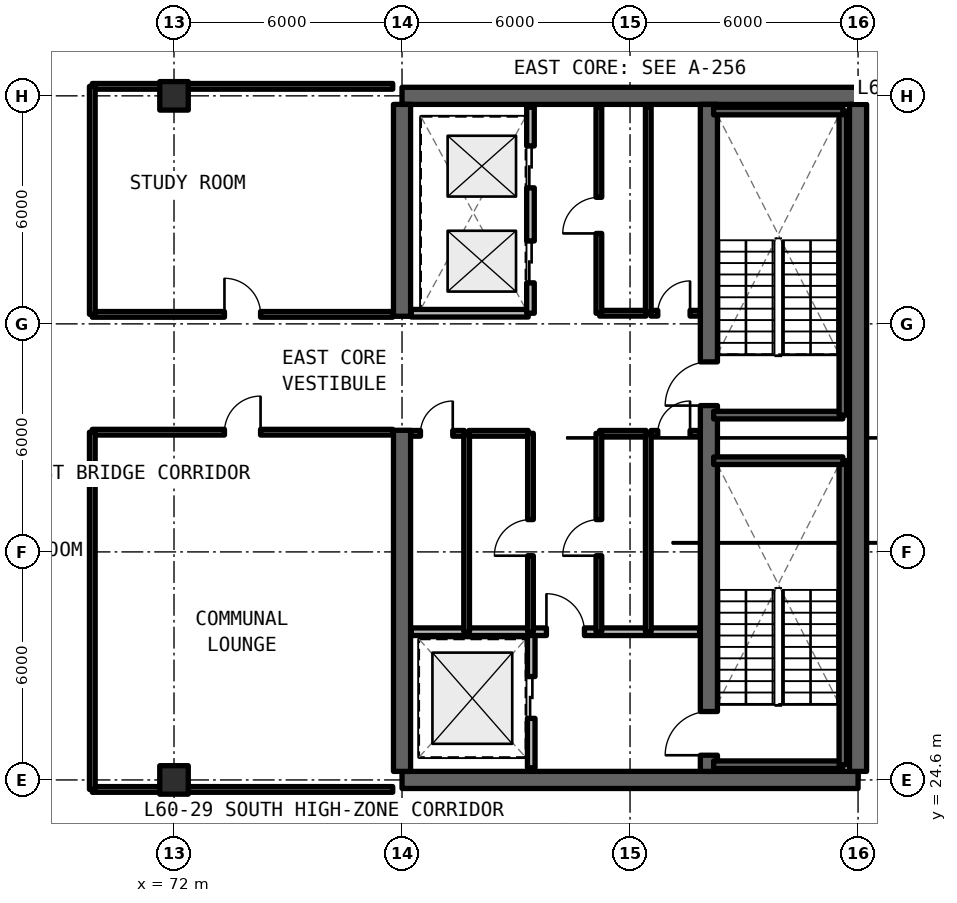
"""IFC4 building model, lengths in metres.
Left out: names, types, materials, properties, quantities, classifications, styles, units other than length and angle.
Written with IfcOpenShell. Run it as: python <this file> out.ifc"""

import sys

from ifc_helpers import new_model, si_unit, direction, frame, frame_2d, origin, origin_2d, place, context, subcontext, project, spatial, rectangle, extrude, element, fill, save


model = new_model("IFC4")
c1 = context("Model", 3, precision=1e-05, world=origin(), true_north=direction((0.0, 1.0)))
c2 = subcontext(c1, "Body", "Model", "MODEL_VIEW")
j1 = project(units=[si_unit("LENGTHUNIT", "METRE"), si_unit("PLANEANGLEUNIT", "RADIAN")], contexts=[c1])
p1 = place(None, origin())
s1 = spatial("IfcSite", under=j1, at=p1, CompositionType="ELEMENT")
p2 = place(p1, origin())
s2 = spatial("IfcBuilding", under=s1, at=p2, CompositionType="ELEMENT")
p3 = place(p2, frame((0.0, 0.0, 215.49)))
s3 = spatial("IfcBuildingStorey", under=s2, at=p3, CompositionType="ELEMENT", Elevation=215.49)
for number, where, z_axis, x_axis in (
    (1, (78.0, 24.6, 0.0), (0.0, 0.0, 1.0), (1.0, 0.0, 0.0)),
    (2, (90.0, 42.6, 0.0), (0.0, 0.0, 1.0), (-1.0, 0.0, 0.0)),
):
    element("IfcWall", number, at=place(p3, frame(where, z_axis=z_axis, x_axis=x_axis)), inside=s3, PredefinedType="SHEAR", context=c2, shape_type="SweptSolid", body=[
        extrude(rectangle(XDim=12.0, YDim=0.45, at=frame_2d((6.0, 0.0))), origin(), (0.0, 0.0, 1.0), 3.63),
    ])
p4 = place(p3, frame((90.0, 24.825, 0.0), z_axis=(0.0, 0.0, 1.0), x_axis=(0.0, 1.0, 0.0)))
e3 = element("IfcWall", 3, at=p4, inside=s3, PredefinedType="SHEAR", context=c2, shape_type="SweptSolid", body=[
    extrude(rectangle(XDim=17.55, YDim=0.45, at=frame_2d((8.775, 0.0))), origin(), (0.0, 0.0, 1.0), 3.63),
])
p5 = place(p3, frame((78.0, 24.825, 0.0), z_axis=(0.0, 0.0, 1.0), x_axis=(0.0, 1.0, 0.0)))
e4 = element("IfcWall", 4, at=p5, inside=s3, PredefinedType="SHEAR", context=c2, shape_type="SweptSolid", body=[
    extrude(rectangle(XDim=8.975, YDim=0.45, at=frame_2d((4.488, 0.0))), origin(), (0.0, 0.0, 1.0), 3.63),
])
p6 = place(p3, frame((78.0, 36.8, 0.0), z_axis=(0.0, 0.0, 1.0), x_axis=(0.0, 1.0, 0.0)))
e5 = element("IfcWall", 5, at=p6, inside=s3, PredefinedType="SHEAR", context=c2, shape_type="SweptSolid", body=[
    extrude(rectangle(XDim=5.575, YDim=0.45, at=frame_2d((2.788, 0.0))), origin(), (0.0, 0.0, 1.0), 3.63),
])
p7 = place(p3, frame((86.075, 24.825, 0.0), z_axis=(0.0, 0.0, 1.0), x_axis=(0.0, 1.0, 0.0)))
e6 = element("IfcWall", 6, at=p7, inside=s3, PredefinedType="SHEAR", context=c2, shape_type="SweptSolid", body=[
    extrude(rectangle(XDim=17.55, YDim=0.45, at=frame_2d((8.775, 0.0))), origin(), (0.0, 0.0, 1.0), 3.63),
])
p8 = place(p7, frame((0.425, 0.0, 0.0)))
e7 = element("IfcOpeningElement", 7, at=p8, cuts=e6, PredefinedType="OPENING", context=c2, shape_type="SweptSolid", body=[
    extrude(rectangle(XDim=1.15, YDim=2.15, at=frame_2d((0.575, 1.075))), frame((0.0, 0.235, 0.0), z_axis=(0.0, -1.0, 0.0), x_axis=(1.0, 0.0, 0.0)), (0.0, 0.0, 1.0), 0.47),
])
p9 = place(p7, frame((9.625, 0.0, 0.0)))
e8 = element("IfcOpeningElement", 8, at=p9, cuts=e6, PredefinedType="OPENING", context=c2, shape_type="SweptSolid", body=[
    extrude(rectangle(XDim=1.15, YDim=2.15, at=frame_2d((0.575, 1.075))), frame((0.0, 0.235, 0.0), z_axis=(0.0, -1.0, 0.0), x_axis=(1.0, 0.0, 0.0)), (0.0, 0.0, 1.0), 0.47),
])
for number, where, z_axis, x_axis in (
    (9, (72.0, 24.6, 0.0), (0.0, 0.0, 1.0), (1.0, 0.0, 0.0)),
    (10, (72.0, 42.6, 0.0), (0.0, 0.0, 1.0), (1.0, 0.0, 0.0)),
):
    element("IfcColumn", number, at=place(p3, frame(where, z_axis=z_axis, x_axis=x_axis)), inside=s3, PredefinedType="COLUMN", context=c2, shape_type="SweptSolid", body=[
        extrude(rectangle(XDim=0.75, YDim=0.75, at=origin_2d()), origin(), (0.0, 0.0, 1.0), 3.63),
    ])
p10 = place(p3, frame((81.4, 24.92, 0.0), z_axis=(0.0, 0.0, 1.0), x_axis=(0.0, 1.0, 0.0)))
e11 = element("IfcWall", 11, at=p10, inside=s3, PredefinedType="SOLIDWALL", context=c2, shape_type="SweptSolid", body=[
    extrude(rectangle(XDim=3.58, YDim=0.2, at=frame_2d((1.79, 0.0))), origin(), (0.0, 0.0, 1.0), 2.63),
])
p11 = place(p10, frame((1.3, 0.0, 0.0)))
e12 = element("IfcOpeningElement", 12, at=p11, cuts=e11, PredefinedType="OPENING", context=c2, shape_type="SweptSolid", body=[
    extrude(rectangle(XDim=1.1, YDim=2.2, at=frame_2d((0.55, 1.1))), frame((0.0, 0.11, 0.0), z_axis=(0.0, -1.0, 0.0), x_axis=(1.0, 0.0, 0.0)), (0.0, 0.0, 1.0), 0.22),
])
p12 = place(p3, frame((78.245, 28.5, 0.0), z_axis=(0.0, 0.0, 1.0), x_axis=(1.0, 0.0, 0.0)))
e13 = element("IfcWall", 13, at=p12, inside=s3, PredefinedType="SOLIDWALL", context=c2, shape_type="SweptSolid", body=[
    extrude(rectangle(XDim=7.585, YDim=0.2, at=frame_2d((3.792, 0.0))), origin(), (0.0, 0.0, 1.0), 2.63),
])
p13 = place(p12, frame((3.555, 0.0, 0.0)))
e14 = element("IfcOpeningElement", 14, at=p13, cuts=e13, PredefinedType="OPENING", context=c2, shape_type="SweptSolid", body=[
    extrude(rectangle(XDim=1.0, YDim=2.15, at=frame_2d((0.5, 1.075))), frame((0.0, 0.11, 0.0), z_axis=(0.0, -1.0, 0.0), x_axis=(1.0, 0.0, 0.0)), (0.0, 0.0, 1.0), 0.22),
])
p14 = place(p3, frame((84.48, 28.5, 0.0), z_axis=(0.0, 0.0, 1.0), x_axis=(0.0, 1.0, 0.0)))
e15 = element("IfcWall", 15, at=p14, inside=s3, PredefinedType="SOLIDWALL", context=c2, shape_type="SweptSolid", body=[
    extrude(rectangle(XDim=5.22, YDim=0.15, at=frame_2d((2.61, 0.0))), origin(), (0.0, 0.0, 1.0), 2.63),
])
p15 = place(p3, frame((84.55, 33.72, 0.0), z_axis=(0.0, 0.0, 1.0), x_axis=(1.0, 0.0, 0.0)))
e16 = element("IfcWall", 16, at=p15, inside=s3, PredefinedType="SOLIDWALL", context=c2, shape_type="SweptSolid", body=[
    extrude(rectangle(XDim=1.28, YDim=0.15, at=frame_2d((0.64, 0.0))), origin(), (0.0, 0.0, 1.0), 2.63),
])
p16 = place(p15, frame((0.18, 0.0, 0.0)))
e17 = element("IfcOpeningElement", 17, at=p16, cuts=e16, PredefinedType="OPENING", context=c2, shape_type="SweptSolid", body=[
    extrude(rectangle(XDim=0.85, YDim=2.1, at=frame_2d((0.425, 1.05))), frame((0.0, 0.085, 0.0), z_axis=(0.0, -1.0, 0.0), x_axis=(1.0, 0.0, 0.0)), (0.0, 0.0, 1.0), 0.17),
])
p17 = place(p3, frame((83.2, 33.72, 0.0), z_axis=(0.0, 0.0, 1.0), x_axis=(1.0, 0.0, 0.0)))
e18 = element("IfcWall", 18, at=p17, inside=s3, PredefinedType="SOLIDWALL", context=c2, shape_type="SweptSolid", body=[
    extrude(rectangle(XDim=1.22, YDim=0.15, at=frame_2d((0.61, 0.0))), origin(), (0.0, 0.0, 1.0), 2.63),
])
p18 = place(p3, frame((83.18, 28.5, 0.0), z_axis=(0.0, 0.0, 1.0), x_axis=(0.0, 1.0, 0.0)))
e19 = element("IfcWall", 19, at=p18, inside=s3, PredefinedType="SOLIDWALL", context=c2, shape_type="SweptSolid", body=[
    extrude(rectangle(XDim=5.22, YDim=0.15, at=frame_2d((2.61, 0.0))), origin(), (0.0, 0.0, 1.0), 2.63),
])
p19 = place(p18, frame((2.0, 0.0, 0.0)))
e20 = element("IfcOpeningElement", 20, at=p19, cuts=e19, PredefinedType="OPENING", context=c2, shape_type="SweptSolid", body=[
    extrude(rectangle(XDim=0.95, YDim=2.15, at=frame_2d((0.475, 1.075))), frame((0.0, 0.085, 0.0), z_axis=(0.0, -1.0, 0.0), x_axis=(1.0, 0.0, 0.0)), (0.0, 0.0, 1.0), 0.17),
])
p20 = place(p3, frame((79.7, 28.5, 0.0), z_axis=(0.0, 0.0, 1.0), x_axis=(0.0, 1.0, 0.0)))
e21 = element("IfcWall", 21, at=p20, inside=s3, PredefinedType="SOLIDWALL", context=c2, shape_type="SweptSolid", body=[
    extrude(rectangle(XDim=5.22, YDim=0.15, at=frame_2d((2.61, 0.0))), origin(), (0.0, 0.0, 1.0), 2.63),
])
p21 = place(p3, frame((79.76, 33.72, 0.0), z_axis=(0.0, 0.0, 1.0), x_axis=(1.0, 0.0, 0.0)))
e22 = element("IfcWall", 22, at=p21, inside=s3, PredefinedType="SOLIDWALL", context=c2, shape_type="SweptSolid", body=[
    extrude(rectangle(XDim=1.56, YDim=0.15, at=frame_2d((0.78, 0.0))), origin(), (0.0, 0.0, 1.0), 2.63),
])
p22 = place(p3, frame((78.245, 33.72, 0.0), z_axis=(0.0, 0.0, 1.0), x_axis=(1.0, 0.0, 0.0)))
e23 = element("IfcWall", 23, at=p22, inside=s3, PredefinedType="SOLIDWALL", context=c2, shape_type="SweptSolid", body=[
    extrude(rectangle(XDim=1.395, YDim=0.15, at=frame_2d((0.697, 0.0))), origin(), (0.0, 0.0, 1.0), 2.63),
])
p23 = place(p22, frame((0.24, 0.0, 0.0)))
e24 = element("IfcOpeningElement", 24, at=p23, cuts=e23, PredefinedType="OPENING", context=c2, shape_type="SweptSolid", body=[
    extrude(rectangle(XDim=0.85, YDim=2.1, at=frame_2d((0.425, 1.05))), frame((0.0, 0.085, 0.0), z_axis=(0.0, -1.0, 0.0), x_axis=(1.0, 0.0, 0.0)), (0.0, 0.0, 1.0), 0.17),
])
p24 = place(p3, frame((81.38, 28.5, 0.0), z_axis=(0.0, 0.0, 1.0), x_axis=(0.0, 1.0, 0.0)))
e25 = element("IfcWall", 25, at=p24, inside=s3, PredefinedType="SOLIDWALL", context=c2, shape_type="SweptSolid", body=[
    extrude(rectangle(XDim=5.22, YDim=0.15, at=frame_2d((2.61, 0.0))), origin(), (0.0, 0.0, 1.0), 2.63),
])
p25 = place(p24, frame((2.0, 0.0, 0.0)))
e26 = element("IfcOpeningElement", 26, at=p25, cuts=e25, PredefinedType="OPENING", context=c2, shape_type="SweptSolid", body=[
    extrude(rectangle(XDim=0.95, YDim=2.15, at=frame_2d((0.475, 1.075))), frame((0.0, 0.085, 0.0), z_axis=(0.0, -1.0, 0.0), x_axis=(1.0, 0.0, 0.0)), (0.0, 0.0, 1.0), 0.17),
])
p26 = place(p3, frame((84.48, 36.88, 0.0), z_axis=(0.0, 0.0, 1.0), x_axis=(0.0, 1.0, 0.0)))
e27 = element("IfcWall", 27, at=p26, inside=s3, PredefinedType="SOLIDWALL", context=c2, shape_type="SweptSolid", body=[
    extrude(rectangle(XDim=5.42, YDim=0.15, at=frame_2d((2.71, 0.0))), origin(), (0.0, 0.0, 1.0), 2.63),
])
p27 = place(p3, frame((84.55, 36.88, 0.0), z_axis=(0.0, 0.0, 1.0), x_axis=(1.0, 0.0, 0.0)))
e28 = element("IfcWall", 28, at=p27, inside=s3, PredefinedType="SOLIDWALL", context=c2, shape_type="SweptSolid", body=[
    extrude(rectangle(XDim=1.28, YDim=0.15, at=frame_2d((0.64, 0.0))), origin(), (0.0, 0.0, 1.0), 2.63),
])
p28 = place(p27, frame((0.18, 0.0, 0.0)))
e29 = element("IfcOpeningElement", 29, at=p28, cuts=e28, PredefinedType="OPENING", context=c2, shape_type="SweptSolid", body=[
    extrude(rectangle(XDim=0.85, YDim=2.1, at=frame_2d((0.425, 1.05))), frame((0.0, 0.085, 0.0), z_axis=(0.0, -1.0, 0.0), x_axis=(1.0, 0.0, 0.0)), (0.0, 0.0, 1.0), 0.17),
])
p29 = place(p3, frame((83.2, 36.88, 0.0), z_axis=(0.0, 0.0, 1.0), x_axis=(1.0, 0.0, 0.0)))
e30 = element("IfcWall", 30, at=p29, inside=s3, PredefinedType="SOLIDWALL", context=c2, shape_type="SweptSolid", body=[
    extrude(rectangle(XDim=1.22, YDim=0.15, at=frame_2d((0.61, 0.0))), origin(), (0.0, 0.0, 1.0), 2.63),
])
p30 = place(p3, frame((83.18, 36.88, 0.0), z_axis=(0.0, 0.0, 1.0), x_axis=(0.0, 1.0, 0.0)))
e31 = element("IfcWall", 31, at=p30, inside=s3, PredefinedType="SOLIDWALL", context=c2, shape_type="SweptSolid", body=[
    extrude(rectangle(XDim=5.42, YDim=0.15, at=frame_2d((2.71, 0.0))), origin(), (0.0, 0.0, 1.0), 2.63),
])
p31 = place(p30, frame((2.1, 0.0, 0.0)))
e32 = element("IfcOpeningElement", 32, at=p31, cuts=e31, PredefinedType="OPENING", context=c2, shape_type="SweptSolid", body=[
    extrude(rectangle(XDim=0.95, YDim=2.15, at=frame_2d((0.475, 1.075))), frame((0.0, 0.085, 0.0), z_axis=(0.0, -1.0, 0.0), x_axis=(1.0, 0.0, 0.0)), (0.0, 0.0, 1.0), 0.17),
])
p32 = place(p3, frame((78.245, 36.88, 0.0), z_axis=(0.0, 0.0, 1.0), x_axis=(1.0, 0.0, 0.0)))
e33 = element("IfcWall", 33, at=p32, inside=s3, PredefinedType="SOLIDWALL", context=c2, shape_type="SweptSolid", body=[
    extrude(rectangle(XDim=3.075, YDim=0.2, at=frame_2d((1.538, 0.0))), origin(), (0.0, 0.0, 1.0), 2.63),
])
p33 = place(p3, frame((81.38, 36.88, 0.0), z_axis=(0.0, 0.0, 1.0), x_axis=(0.0, 1.0, 0.0)))
e34 = element("IfcWall", 34, at=p33, inside=s3, PredefinedType="SOLIDWALL", context=c2, shape_type="SweptSolid", body=[
    extrude(rectangle(XDim=5.42, YDim=0.2, at=frame_2d((2.71, 0.0))), origin(), (0.0, 0.0, 1.0), 2.63),
])
p34 = place(p33, frame((0.8, 0.0, 0.0)))
e35 = element("IfcOpeningElement", 35, at=p34, cuts=e34, PredefinedType="OPENING", context=c2, shape_type="SweptSolid", body=[
    extrude(rectangle(XDim=1.1, YDim=2.2, at=frame_2d((0.55, 1.1))), frame((0.0, 0.11, 0.0), z_axis=(0.0, -1.0, 0.0), x_axis=(1.0, 0.0, 0.0)), (0.0, 0.0, 1.0), 0.22),
])
p35 = place(p33, frame((3.3, 0.0, 0.0)))
e36 = element("IfcOpeningElement", 36, at=p35, cuts=e34, PredefinedType="OPENING", context=c2, shape_type="SweptSolid", body=[
    extrude(rectangle(XDim=1.1, YDim=2.2, at=frame_2d((0.55, 1.1))), frame((0.0, 0.11, 0.0), z_axis=(0.0, -1.0, 0.0), x_axis=(1.0, 0.0, 0.0)), (0.0, 0.0, 1.0), 0.22),
])
p36 = place(p3, frame((69.85, 24.35, 0.0), z_axis=(0.0, 0.0, 1.0), x_axis=(1.0, 0.0, 0.0)))
e37 = element("IfcWall", 37, at=p36, inside=s3, PredefinedType="SOLIDWALL", context=c2, shape_type="SweptSolid", body=[
    extrude(rectangle(XDim=7.905, YDim=0.15, at=frame_2d((3.952, 0.0))), origin(), (0.0, 0.0, 1.0), 2.63),
])
p37 = place(p3, frame((69.85, 33.75, 0.0), z_axis=(0.0, 0.0, 1.0), x_axis=(1.0, 0.0, 0.0)))
e38 = element("IfcWall", 38, at=p37, inside=s3, PredefinedType="SOLIDWALL", context=c2, shape_type="SweptSolid", body=[
    extrude(rectangle(XDim=7.905, YDim=0.15, at=frame_2d((3.952, 0.0))), origin(), (0.0, 0.0, 1.0), 2.63),
])
p38 = place(p37, frame((3.478, 0.0, 0.0)))
e39 = element("IfcOpeningElement", 39, at=p38, cuts=e38, PredefinedType="OPENING", context=c2, shape_type="SweptSolid", body=[
    extrude(rectangle(XDim=0.95, YDim=2.15, at=frame_2d((0.475, 1.075))), frame((0.0, 0.085, 0.0), z_axis=(0.0, -1.0, 0.0), x_axis=(1.0, 0.0, 0.0)), (0.0, 0.0, 1.0), 0.17),
])
p39 = place(p3, frame((69.85, 24.35, 0.0), z_axis=(0.0, 0.0, 1.0), x_axis=(0.0, 1.0, 0.0)))
e40 = element("IfcWall", 40, at=p39, inside=s3, PredefinedType="SOLIDWALL", context=c2, shape_type="SweptSolid", body=[
    extrude(rectangle(XDim=9.4, YDim=0.15, at=frame_2d((4.7, 0.0))), origin(), (0.0, 0.0, 1.0), 2.63),
])
p40 = place(p3, frame((69.85, 36.85, 0.0), z_axis=(0.0, 0.0, 1.0), x_axis=(1.0, 0.0, 0.0)))
e41 = element("IfcWall", 41, at=p40, inside=s3, PredefinedType="SOLIDWALL", context=c2, shape_type="SweptSolid", body=[
    extrude(rectangle(XDim=7.905, YDim=0.15, at=frame_2d((3.952, 0.0))), origin(), (0.0, 0.0, 1.0), 2.63),
])
p41 = place(p40, frame((3.478, 0.0, 0.0)))
e42 = element("IfcOpeningElement", 42, at=p41, cuts=e41, PredefinedType="OPENING", context=c2, shape_type="SweptSolid", body=[
    extrude(rectangle(XDim=0.95, YDim=2.15, at=frame_2d((0.475, 1.075))), frame((0.0, 0.085, 0.0), z_axis=(0.0, -1.0, 0.0), x_axis=(1.0, 0.0, 0.0)), (0.0, 0.0, 1.0), 0.17),
])
p42 = place(p3, frame((69.85, 42.85, 0.0), z_axis=(0.0, 0.0, 1.0), x_axis=(1.0, 0.0, 0.0)))
e43 = element("IfcWall", 43, at=p42, inside=s3, PredefinedType="SOLIDWALL", context=c2, shape_type="SweptSolid", body=[
    extrude(rectangle(XDim=7.905, YDim=0.15, at=frame_2d((3.952, 0.0))), origin(), (0.0, 0.0, 1.0), 2.63),
])
p43 = place(p3, frame((69.85, 36.85, 0.0), z_axis=(0.0, 0.0, 1.0), x_axis=(0.0, 1.0, 0.0)))
e44 = element("IfcWall", 44, at=p43, inside=s3, PredefinedType="SOLIDWALL", context=c2, shape_type="SweptSolid", body=[
    extrude(rectangle(XDim=6.0, YDim=0.15, at=frame_2d((3.0, 0.0))), origin(), (0.0, 0.0, 1.0), 2.63),
])
p44 = place(p3, frame((86.2, 25.0, 0.0), z_axis=(0.0, 0.0, 1.0), x_axis=(1.0, 0.0, 0.0)))
e45 = element("IfcWall", 45, at=p44, inside=s3, PredefinedType="SOLIDWALL", context=c2, shape_type="SweptSolid", body=[
    extrude(rectangle(XDim=3.4, YDim=0.2, at=frame_2d((1.7, 0.0))), origin(), (0.0, 0.0, 1.0), 3.63),
])
p45 = place(p3, frame((89.6, 25.0, 0.0), z_axis=(0.0, 0.0, 1.0), x_axis=(0.0, 1.0, 0.0)))
e46 = element("IfcWall", 46, at=p45, inside=s3, PredefinedType="SOLIDWALL", context=c2, shape_type="SweptSolid", body=[
    extrude(rectangle(XDim=8.0, YDim=0.2, at=frame_2d((4.0, 0.0))), origin(), (0.0, 0.0, 1.0), 3.63),
])
for number, where, z_axis, x_axis in (
    (47, (89.6, 33.0, 0.0), (0.0, 0.0, 1.0), (-1.0, 0.0, 0.0)),
    (48, (86.2, 34.2, 0.0), (0.0, 0.0, 1.0), (1.0, 0.0, 0.0)),
):
    element("IfcWall", number, at=place(p3, frame(where, z_axis=z_axis, x_axis=x_axis)), inside=s3, PredefinedType="SOLIDWALL", context=c2, shape_type="SweptSolid", body=[
        extrude(rectangle(XDim=3.4, YDim=0.2, at=frame_2d((1.7, 0.0))), origin(), (0.0, 0.0, 1.0), 3.63),
    ])
p46 = place(p3, frame((89.6, 34.2, 0.0), z_axis=(0.0, 0.0, 1.0), x_axis=(0.0, 1.0, 0.0)))
e49 = element("IfcWall", 49, at=p46, inside=s3, PredefinedType="SOLIDWALL", context=c2, shape_type="SweptSolid", body=[
    extrude(rectangle(XDim=8.0, YDim=0.2, at=frame_2d((4.0, 0.0))), origin(), (0.0, 0.0, 1.0), 3.63),
])
p47 = place(p3, frame((89.6, 42.2, 0.0), z_axis=(0.0, 0.0, 1.0), x_axis=(-1.0, 0.0, 0.0)))
e50 = element("IfcWall", 50, at=p47, inside=s3, PredefinedType="SOLIDWALL", context=c2, shape_type="SweptSolid", body=[
    extrude(rectangle(XDim=3.4, YDim=0.2, at=frame_2d((1.7, 0.0))), origin(), (0.0, 0.0, 1.0), 3.63),
])
p48 = place(p11, origin())
e51 = element("IfcDoor", 51, at=p48, inside=s3, OperationType="SLIDING_TO_LEFT", PredefinedType="DOOR", context=c2, shape_type="SweptSolid", body=[
    extrude(rectangle(XDim=1.1, YDim=2.2, at=frame_2d((0.55, 1.1))), frame((0.0, 0.025, 0.0), z_axis=(0.0, -1.0, 0.0), x_axis=(1.0, 0.0, 0.0)), (0.0, 0.0, 1.0), 0.05),
])
fill(e12, e51)
p49 = place(p13, origin())
e52 = element("IfcDoor", 52, at=p49, inside=s3, OperationType="SINGLE_SWING_LEFT", PredefinedType="DOOR", context=c2, shape_type="SweptSolid", body=[
    extrude(rectangle(XDim=1.0, YDim=2.15, at=frame_2d((0.5, 1.075))), frame((0.0, 0.025, 0.0), z_axis=(0.0, -1.0, 0.0), x_axis=(1.0, 0.0, 0.0)), (0.0, 0.0, 1.0), 0.05),
])
fill(e14, e52)
p50 = place(p16, origin())
e53 = element("IfcDoor", 53, at=p50, inside=s3, OperationType="SINGLE_SWING_RIGHT", PredefinedType="DOOR", context=c2, shape_type="SweptSolid", body=[
    extrude(rectangle(XDim=0.85, YDim=2.1, at=frame_2d((0.425, 1.05))), frame((0.0, 0.025, 0.0), z_axis=(0.0, -1.0, 0.0), x_axis=(1.0, 0.0, 0.0)), (0.0, 0.0, 1.0), 0.05),
])
fill(e17, e53)
p51 = place(p19, origin())
e54 = element("IfcDoor", 54, at=p51, inside=s3, OperationType="SINGLE_SWING_LEFT", PredefinedType="DOOR", context=c2, shape_type="SweptSolid", body=[
    extrude(rectangle(XDim=0.95, YDim=2.15, at=frame_2d((0.475, 1.075))), frame((0.0, 0.025, 0.0), z_axis=(0.0, -1.0, 0.0), x_axis=(1.0, 0.0, 0.0)), (0.0, 0.0, 1.0), 0.05),
])
fill(e20, e54)
p52 = place(p23, origin())
e55 = element("IfcDoor", 55, at=p52, inside=s3, OperationType="SINGLE_SWING_RIGHT", PredefinedType="DOOR", context=c2, shape_type="SweptSolid", body=[
    extrude(rectangle(XDim=0.85, YDim=2.1, at=frame_2d((0.425, 1.05))), frame((0.0, 0.025, 0.0), z_axis=(0.0, -1.0, 0.0), x_axis=(1.0, 0.0, 0.0)), (0.0, 0.0, 1.0), 0.05),
])
fill(e24, e55)
p53 = place(p25, origin())
e56 = element("IfcDoor", 56, at=p53, inside=s3, OperationType="SINGLE_SWING_LEFT", PredefinedType="DOOR", context=c2, shape_type="SweptSolid", body=[
    extrude(rectangle(XDim=0.95, YDim=2.15, at=frame_2d((0.475, 1.075))), frame((0.0, 0.025, 0.0), z_axis=(0.0, -1.0, 0.0), x_axis=(1.0, 0.0, 0.0)), (0.0, 0.0, 1.0), 0.05),
])
fill(e26, e56)
p54 = place(p28, origin())
e57 = element("IfcDoor", 57, at=p54, inside=s3, OperationType="SINGLE_SWING_RIGHT", PredefinedType="DOOR", context=c2, shape_type="SweptSolid", body=[
    extrude(rectangle(XDim=0.85, YDim=2.1, at=frame_2d((0.425, 1.05))), frame((0.0, 0.025, 0.0), z_axis=(0.0, -1.0, 0.0), x_axis=(1.0, 0.0, 0.0)), (0.0, 0.0, 1.0), 0.05),
])
fill(e29, e57)
p55 = place(p31, origin())
e58 = element("IfcDoor", 58, at=p55, inside=s3, OperationType="SINGLE_SWING_LEFT", PredefinedType="DOOR", context=c2, shape_type="SweptSolid", body=[
    extrude(rectangle(XDim=0.95, YDim=2.15, at=frame_2d((0.475, 1.075))), frame((0.0, 0.025, 0.0), z_axis=(0.0, -1.0, 0.0), x_axis=(1.0, 0.0, 0.0)), (0.0, 0.0, 1.0), 0.05),
])
fill(e32, e58)
p56 = place(p34, origin())
e59 = element("IfcDoor", 59, at=p56, inside=s3, OperationType="SLIDING_TO_LEFT", PredefinedType="DOOR", context=c2, shape_type="SweptSolid", body=[
    extrude(rectangle(XDim=1.1, YDim=2.2, at=frame_2d((0.55, 1.1))), frame((0.0, 0.025, 0.0), z_axis=(0.0, -1.0, 0.0), x_axis=(1.0, 0.0, 0.0)), (0.0, 0.0, 1.0), 0.05),
])
fill(e35, e59)
p57 = place(p35, origin())
e60 = element("IfcDoor", 60, at=p57, inside=s3, OperationType="SLIDING_TO_RIGHT", PredefinedType="DOOR", context=c2, shape_type="SweptSolid", body=[
    extrude(rectangle(XDim=1.1, YDim=2.2, at=frame_2d((0.55, 1.1))), frame((0.0, 0.025, 0.0), z_axis=(0.0, -1.0, 0.0), x_axis=(1.0, 0.0, 0.0)), (0.0, 0.0, 1.0), 0.05),
])
fill(e36, e60)
p58 = place(p38, origin())
e61 = element("IfcDoor", 61, at=p58, inside=s3, OperationType="SINGLE_SWING_RIGHT", PredefinedType="DOOR", context=c2, shape_type="SweptSolid", body=[
    extrude(rectangle(XDim=0.95, YDim=2.15, at=frame_2d((0.475, 1.075))), frame((0.0, 0.025, 0.0), z_axis=(0.0, -1.0, 0.0), x_axis=(1.0, 0.0, 0.0)), (0.0, 0.0, 1.0), 0.05),
])
fill(e39, e61)
p59 = place(p41, origin())
e62 = element("IfcDoor", 62, at=p59, inside=s3, OperationType="SINGLE_SWING_LEFT", PredefinedType="DOOR", context=c2, shape_type="SweptSolid", body=[
    extrude(rectangle(XDim=0.95, YDim=2.15, at=frame_2d((0.475, 1.075))), frame((0.0, 0.025, 0.0), z_axis=(0.0, -1.0, 0.0), x_axis=(1.0, 0.0, 0.0)), (0.0, 0.0, 1.0), 0.05),
])
fill(e42, e62)
p60 = place(p8, origin())
e63 = element("IfcDoor", 63, at=p60, inside=s3, OperationType="SINGLE_SWING_RIGHT", PredefinedType="DOOR", context=c2, shape_type="SweptSolid", body=[
    extrude(rectangle(XDim=1.15, YDim=2.15, at=frame_2d((0.575, 1.075))), frame((0.0, 0.025, 0.0), z_axis=(0.0, -1.0, 0.0), x_axis=(1.0, 0.0, 0.0)), (0.0, 0.0, 1.0), 0.05),
])
fill(e7, e63)
p61 = place(p9, origin())
e64 = element("IfcDoor", 64, at=p61, inside=s3, OperationType="SINGLE_SWING_LEFT", PredefinedType="DOOR", context=c2, shape_type="SweptSolid", body=[
    extrude(rectangle(XDim=1.15, YDim=2.15, at=frame_2d((0.575, 1.075))), frame((0.0, 0.025, 0.0), z_axis=(0.0, -1.0, 0.0), x_axis=(1.0, 0.0, 0.0)), (0.0, 0.0, 1.0), 0.05),
])
fill(e8, e64)
save(model, sys.argv[1])
